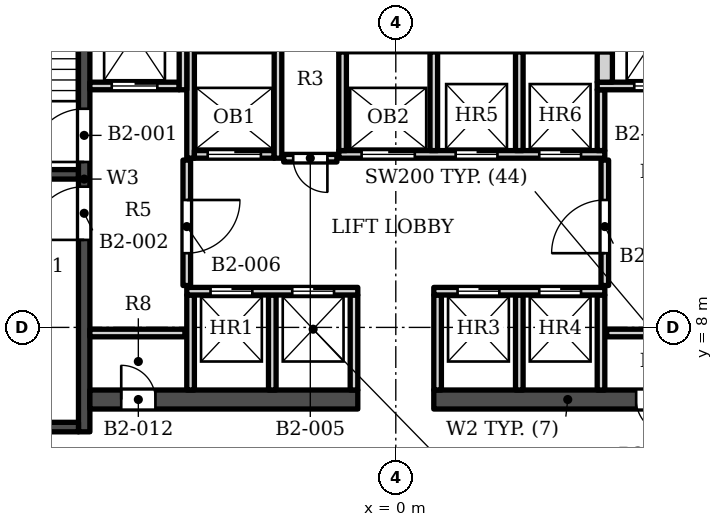
"""IFC4 building model, lengths in metres.
Left out: names, types, materials, properties, quantities, classifications, styles, units other than length and angle.
Written with IfcOpenShell. Run it as: python <this file> out.ifc"""

import sys

from ifc_helpers import new_model, si_unit, direction, frame, frame_2d, origin, place, context, subcontext, project, spatial, rectangle, extrude, element, fill, save


model = new_model("IFC4")
c1 = context("Model", 3, precision=1e-05, world=origin(), true_north=direction((0.0, 1.0)))
c2 = subcontext(c1, "Body", "Model", "MODEL_VIEW")
j1 = project(units=[si_unit("LENGTHUNIT", "METRE"), si_unit("PLANEANGLEUNIT", "RADIAN")], contexts=[c1])
p1 = place(None, origin())
s1 = spatial("IfcSite", under=j1, at=p1, CompositionType="ELEMENT")
p2 = place(p1, origin())
s2 = spatial("IfcBuilding", under=s1, at=p2, CompositionType="ELEMENT")
p3 = place(p2, frame((0.0, 0.0, -10.0)))
s3 = spatial("IfcBuildingStorey", under=s2, at=p3, CompositionType="ELEMENT", Elevation=-10.0)
p4 = place(p3, frame((-8.2, 5.253, -1.6), z_axis=(0.0, 0.0, 1.0), x_axis=(0.0, 1.0, 0.0)))
e1 = element("IfcWall", 1, at=p4, inside=s3, PredefinedType="SHEAR", context=c2, shape_type="SweptSolid", body=[
    extrude(rectangle(XDim=13.3, YDim=0.3, at=frame_2d((6.65, 0.0))), origin(), (0.0, 0.0, 1.0), 6.6),
])
p5 = place(p4, frame((7.1, 0.0, 1.6)))
e2 = element("IfcOpeningElement", 2, at=p5, cuts=e1, PredefinedType="OPENING", context=c2, shape_type="SweptSolid", body=[
    extrude(rectangle(XDim=1.4, YDim=2.1, at=frame_2d((0.7, 1.05))), frame((0.0, 0.16, 0.0), z_axis=(0.0, -1.0, 0.0), x_axis=(1.0, 0.0, 0.0)), (0.0, 0.0, 1.0), 0.32),
])
p6 = place(p4, frame((5.05, 0.0, 1.6)))
e3 = element("IfcOpeningElement", 3, at=p6, cuts=e1, PredefinedType="OPENING", context=c2, shape_type="SweptSolid", body=[
    extrude(rectangle(XDim=1.4, YDim=2.1, at=frame_2d((0.7, 1.05))), frame((0.0, 0.16, 0.0), z_axis=(0.0, -1.0, 0.0), x_axis=(1.0, 0.0, 0.0)), (0.0, 0.0, 1.0), 0.32),
])
for number, where, z_axis, x_axis in (
    (4, (-12.1, 12.028, -1.6), (0.0, 0.0, 1.0), (1.0, 0.0, 0.0)),
    (5, (-12.1, 5.378, -1.6), (0.0, 0.0, 1.0), (1.0, 0.0, 0.0)),
):
    element("IfcWall", number, at=place(p3, frame(where, z_axis=z_axis, x_axis=x_axis)), inside=s3, PredefinedType="SHEAR", context=c2, shape_type="SweptSolid", body=[
        extrude(rectangle(XDim=3.75, YDim=0.25, at=frame_2d((1.875, 0.0))), origin(), (0.0, 0.0, 1.0), 6.6),
    ])
p7 = place(p3, frame((-8.05, 6.103, -1.6), z_axis=(0.0, 0.0, 1.0), x_axis=(1.0, 0.0, 0.0)))
e6 = element("IfcWall", 6, at=p7, inside=s3, PredefinedType="SHEAR", context=c2, shape_type="SweptSolid", body=[
    extrude(rectangle(XDim=7.05, YDim=0.5, at=frame_2d((3.525, 0.0))), origin(), (0.0, 0.0, 1.0), 6.6),
])
p8 = place(p7, frame((0.825, 0.0, 1.6)))
e7 = element("IfcOpeningElement", 7, at=p8, cuts=e6, PredefinedType="OPENING", context=c2, shape_type="SweptSolid", body=[
    extrude(rectangle(XDim=0.9, YDim=2.1, at=frame_2d((0.45, 1.05))), frame((0.0, 0.26, 0.0), z_axis=(0.0, -1.0, 0.0), x_axis=(1.0, 0.0, 0.0)), (0.0, 0.0, 1.0), 0.52),
])
p9 = place(p3, frame((1.0, 6.103, -1.6), z_axis=(0.0, 0.0, 1.0), x_axis=(1.0, 0.0, 0.0)))
e8 = element("IfcWall", 8, at=p9, inside=s3, PredefinedType="SHEAR", context=c2, shape_type="SweptSolid", body=[
    extrude(rectangle(XDim=7.05, YDim=0.5, at=frame_2d((3.525, 0.0))), origin(), (0.0, 0.0, 1.0), 6.6),
])
p10 = place(p9, frame((5.325, 0.0, 1.6)))
e9 = element("IfcOpeningElement", 9, at=p10, cuts=e8, PredefinedType="OPENING", context=c2, shape_type="SweptSolid", body=[
    extrude(rectangle(XDim=0.9, YDim=2.1, at=frame_2d((0.45, 1.05))), frame((0.0, 0.26, 0.0), z_axis=(0.0, -1.0, 0.0), x_axis=(1.0, 0.0, 0.0)), (0.0, 0.0, 1.0), 0.52),
])
for number, where, z_axis, x_axis in (
    (10, (-5.4, 6.353, 0.0), (0.0, 0.0, 1.0), (0.0, 1.0, 0.0)),
    (11, (-3.25, 6.353, 0.0), (0.0, 0.0, 1.0), (0.0, 1.0, 0.0)),
    (12, (-1.1, 6.353, 0.0), (0.0, 0.0, 1.0), (0.0, 1.0, 0.0)),
    (13, (1.1, 6.353, 0.0), (0.0, 0.0, 1.0), (0.0, 1.0, 0.0)),
    (14, (3.25, 6.353, 0.0), (0.0, 0.0, 1.0), (0.0, 1.0, 0.0)),
    (15, (5.4, 6.353, 0.0), (0.0, 0.0, 1.0), (0.0, 1.0, 0.0)),
    (16, (-8.05, 7.853, 0.0), (0.0, 0.0, 1.0), (1.0, 0.0, 0.0)),
    (17, (5.55, 7.853, 0.0), (0.0, 0.0, 1.0), (1.0, 0.0, 0.0)),
):
    element("IfcWall", number, at=place(p3, frame(where, z_axis=z_axis, x_axis=x_axis)), inside=s3, PredefinedType="SOLIDWALL", context=c2, shape_type="SweptSolid", body=[
        extrude(rectangle(XDim=2.5, YDim=0.2, at=frame_2d((1.25, 0.0))), origin(), (0.0, 0.0, 1.0), 4.5),
    ])
p11 = place(p3, frame((-5.5, 8.953, 0.0), z_axis=(0.0, 0.0, 1.0), x_axis=(1.0, 0.0, 0.0)))
e18 = element("IfcWall", 18, at=p11, inside=s3, PredefinedType="SOLIDWALL", context=c2, shape_type="SweptSolid", body=[
    extrude(rectangle(XDim=4.5, YDim=0.2, at=frame_2d((2.25, 0.0))), origin(), (0.0, 0.0, 1.0), 4.5),
])
p12 = place(p11, frame((0.625, 0.0, 0.0)))
e19 = element("IfcOpeningElement", 19, at=p12, cuts=e18, PredefinedType="OPENING", context=c2, shape_type="SweptSolid", body=[
    extrude(rectangle(XDim=1.1, YDim=2.1, at=frame_2d((0.55, 1.05))), frame((0.0, 0.11, 0.0), z_axis=(0.0, -1.0, 0.0), x_axis=(1.0, 0.0, 0.0)), (0.0, 0.0, 1.0), 0.22),
])
p13 = place(p11, frame((2.775, 0.0, 0.0)))
e20 = element("IfcOpeningElement", 20, at=p13, cuts=e18, PredefinedType="OPENING", context=c2, shape_type="SweptSolid", body=[
    extrude(rectangle(XDim=1.1, YDim=2.1, at=frame_2d((0.55, 1.05))), frame((0.0, 0.11, 0.0), z_axis=(0.0, -1.0, 0.0), x_axis=(1.0, 0.0, 0.0)), (0.0, 0.0, 1.0), 0.22),
])
p14 = place(p3, frame((1.0, 8.953, 0.0), z_axis=(0.0, 0.0, 1.0), x_axis=(1.0, 0.0, 0.0)))
e21 = element("IfcWall", 21, at=p14, inside=s3, PredefinedType="SOLIDWALL", context=c2, shape_type="SweptSolid", body=[
    extrude(rectangle(XDim=4.5, YDim=0.2, at=frame_2d((2.25, 0.0))), origin(), (0.0, 0.0, 1.0), 4.5),
])
p15 = place(p14, frame((0.625, 0.0, 0.0)))
e22 = element("IfcOpeningElement", 22, at=p15, cuts=e21, PredefinedType="OPENING", context=c2, shape_type="SweptSolid", body=[
    extrude(rectangle(XDim=1.1, YDim=2.1, at=frame_2d((0.55, 1.05))), frame((0.0, 0.11, 0.0), z_axis=(0.0, -1.0, 0.0), x_axis=(1.0, 0.0, 0.0)), (0.0, 0.0, 1.0), 0.22),
])
p16 = place(p14, frame((2.775, 0.0, 0.0)))
e23 = element("IfcOpeningElement", 23, at=p16, cuts=e21, PredefinedType="OPENING", context=c2, shape_type="SweptSolid", body=[
    extrude(rectangle(XDim=1.1, YDim=2.1, at=frame_2d((0.55, 1.05))), frame((0.0, 0.11, 0.0), z_axis=(0.0, -1.0, 0.0), x_axis=(1.0, 0.0, 0.0)), (0.0, 0.0, 1.0), 0.22),
])
p17 = place(p3, frame((-5.5, 9.103, 0.0), z_axis=(0.0, 0.0, 1.0), x_axis=(0.0, 1.0, 0.0)))
e24 = element("IfcWall", 24, at=p17, inside=s3, PredefinedType="SOLIDWALL", context=c2, shape_type="SweptSolid", body=[
    extrude(rectangle(XDim=3.3, YDim=0.2, at=frame_2d((1.65, 0.0))), origin(), (0.0, 0.0, 1.0), 4.5),
])
p18 = place(p17, frame((0.85, 0.0, 0.0)))
e25 = element("IfcOpeningElement", 25, at=p18, cuts=e24, PredefinedType="OPENING", context=c2, shape_type="SweptSolid", body=[
    extrude(rectangle(XDim=1.4, YDim=2.1, at=frame_2d((0.7, 1.05))), frame((0.0, 0.11, 0.0), z_axis=(0.0, -1.0, 0.0), x_axis=(1.0, 0.0, 0.0)), (0.0, 0.0, 1.0), 0.22),
])
p19 = place(p3, frame((5.5, 9.103, 0.0), z_axis=(0.0, 0.0, 1.0), x_axis=(0.0, 1.0, 0.0)))
e26 = element("IfcWall", 26, at=p19, inside=s3, PredefinedType="SOLIDWALL", context=c2, shape_type="SweptSolid", body=[
    extrude(rectangle(XDim=3.3, YDim=0.2, at=frame_2d((1.65, 0.0))), origin(), (0.0, 0.0, 1.0), 4.5),
])
p20 = place(p19, frame((0.85, 0.0, 0.0)))
e27 = element("IfcOpeningElement", 27, at=p20, cuts=e26, PredefinedType="OPENING", context=c2, shape_type="SweptSolid", body=[
    extrude(rectangle(XDim=1.4, YDim=2.1, at=frame_2d((0.7, 1.05))), frame((0.0, 0.11, 0.0), z_axis=(0.0, -1.0, 0.0), x_axis=(1.0, 0.0, 0.0)), (0.0, 0.0, 1.0), 0.22),
])
p21 = place(p3, frame((-2.95, 12.453, 0.0), z_axis=(0.0, 0.0, 1.0), x_axis=(1.0, 0.0, 0.0)))
e28 = element("IfcWall", 28, at=p21, inside=s3, PredefinedType="SOLIDWALL", context=c2, shape_type="SweptSolid", body=[
    extrude(rectangle(XDim=1.4, YDim=0.2, at=frame_2d((0.7, 0.0))), origin(), (0.0, 0.0, 1.0), 4.5),
])
p22 = place(p21, frame((0.25, 0.0, 0.0)))
e29 = element("IfcOpeningElement", 29, at=p22, cuts=e28, PredefinedType="OPENING", context=c2, shape_type="SweptSolid", body=[
    extrude(rectangle(XDim=0.9, YDim=2.1, at=frame_2d((0.45, 1.05))), frame((0.0, 0.11, 0.0), z_axis=(0.0, -1.0, 0.0), x_axis=(1.0, 0.0, 0.0)), (0.0, 0.0, 1.0), 0.22),
])
p23 = place(p3, frame((-5.4, 12.453, 0.0), z_axis=(0.0, 0.0, 1.0), x_axis=(0.0, 1.0, 0.0)))
e30 = element("IfcWall", 30, at=p23, inside=s3, PredefinedType="SOLIDWALL", context=c2, shape_type="SweptSolid", body=[
    extrude(rectangle(XDim=3.0, YDim=0.2, at=frame_2d((1.5, 0.0))), origin(), (0.0, 0.0, 1.0), 4.5),
])
p24 = place(p3, frame((-5.3, 12.552, 0.0), z_axis=(0.0, 0.0, 1.0), x_axis=(1.0, 0.0, 0.0)))
e31 = element("IfcWall", 31, at=p24, inside=s3, PredefinedType="SOLIDWALL", context=c2, shape_type="SweptSolid", body=[
    extrude(rectangle(XDim=2.1, YDim=0.2, at=frame_2d((1.05, 0.0))), origin(), (0.0, 0.0, 1.0), 4.5),
])
p25 = place(p24, frame((0.35, 0.0, 0.0)))
e32 = element("IfcOpeningElement", 32, at=p25, cuts=e31, PredefinedType="OPENING", context=c2, shape_type="SweptSolid", body=[
    extrude(rectangle(XDim=1.4, YDim=2.4, at=frame_2d((0.7, 1.2))), frame((0.0, 0.11, 0.0), z_axis=(0.0, -1.0, 0.0), x_axis=(1.0, 0.0, 0.0)), (0.0, 0.0, 1.0), 0.22),
])
p26 = place(p3, frame((-3.1, 12.453, 0.0), z_axis=(0.0, 0.0, 1.0), x_axis=(0.0, 1.0, 0.0)))
e33 = element("IfcWall", 33, at=p26, inside=s3, PredefinedType="SOLIDWALL", context=c2, shape_type="SweptSolid", body=[
    extrude(rectangle(XDim=3.0, YDim=0.2, at=frame_2d((1.5, 0.0))), origin(), (0.0, 0.0, 1.0), 4.5),
])
p27 = place(p3, frame((-1.5, 12.552, 0.0), z_axis=(0.0, 0.0, 1.0), x_axis=(1.0, 0.0, 0.0)))
e34 = element("IfcWall", 34, at=p27, inside=s3, PredefinedType="SOLIDWALL", context=c2, shape_type="SweptSolid", body=[
    extrude(rectangle(XDim=7.0, YDim=0.2, at=frame_2d((3.5, 0.0))), origin(), (0.0, 0.0, 1.0), 4.5),
])
p28 = place(p27, frame((0.6, 0.0, 0.0)))
e35 = element("IfcOpeningElement", 35, at=p28, cuts=e34, PredefinedType="OPENING", context=c2, shape_type="SweptSolid", body=[
    extrude(rectangle(XDim=1.4, YDim=2.4, at=frame_2d((0.7, 1.2))), frame((0.0, 0.11, 0.0), z_axis=(0.0, -1.0, 0.0), x_axis=(1.0, 0.0, 0.0)), (0.0, 0.0, 1.0), 0.22),
])
p29 = place(p27, frame((3.075, 0.0, 0.0)))
e36 = element("IfcOpeningElement", 36, at=p29, cuts=e34, PredefinedType="OPENING", context=c2, shape_type="SweptSolid", body=[
    extrude(rectangle(XDim=1.1, YDim=2.1, at=frame_2d((0.55, 1.05))), frame((0.0, 0.11, 0.0), z_axis=(0.0, -1.0, 0.0), x_axis=(1.0, 0.0, 0.0)), (0.0, 0.0, 1.0), 0.22),
])
p30 = place(p27, frame((5.275, 0.0, 0.0)))
e37 = element("IfcOpeningElement", 37, at=p30, cuts=e34, PredefinedType="OPENING", context=c2, shape_type="SweptSolid", body=[
    extrude(rectangle(XDim=1.1, YDim=2.1, at=frame_2d((0.55, 1.05))), frame((0.0, 0.11, 0.0), z_axis=(0.0, -1.0, 0.0), x_axis=(1.0, 0.0, 0.0)), (0.0, 0.0, 1.0), 0.22),
])
for number, where, z_axis, x_axis in (
    (38, (-1.4, 12.653, 0.0), (0.0, 0.0, 1.0), (0.0, 1.0, 0.0)),
    (39, (1.0, 12.653, 0.0), (0.0, 0.0, 1.0), (0.0, 1.0, 0.0)),
    (40, (3.25, 12.653, 0.0), (0.0, 0.0, 1.0), (0.0, 1.0, 0.0)),
):
    element("IfcWall", number, at=place(p3, frame(where, z_axis=z_axis, x_axis=x_axis)), inside=s3, PredefinedType="SOLIDWALL", context=c2, shape_type="SweptSolid", body=[
        extrude(rectangle(XDim=2.6, YDim=0.2, at=frame_2d((1.3, 0.0))), origin(), (0.0, 0.0, 1.0), 4.5),
    ])
p31 = place(p3, frame((5.4, 12.653, 0.0), z_axis=(0.0, 0.0, 1.0), x_axis=(0.0, 1.0, 0.0)))
e41 = element("IfcWall", 41, at=p31, inside=s3, PredefinedType="SOLIDWALL", context=c2, shape_type="SweptSolid", body=[
    extrude(rectangle(XDim=1.6, YDim=0.2, at=frame_2d((0.8, 0.0))), origin(), (0.0, 0.0, 1.0), 4.5),
])
p32 = place(p3, frame((-8.05, 14.353, 0.0), z_axis=(0.0, 0.0, 1.0), x_axis=(1.0, 0.0, 0.0)))
e42 = element("IfcWall", 42, at=p32, inside=s3, PredefinedType="SOLIDWALL", context=c2, shape_type="SweptSolid", body=[
    extrude(rectangle(XDim=2.35, YDim=0.2, at=frame_2d((1.175, 0.0))), origin(), (0.0, 0.0, 1.0), 4.5),
])
p33 = place(p32, frame((0.575, 0.0, 0.0)))
e43 = element("IfcOpeningElement", 43, at=p33, cuts=e42, PredefinedType="OPENING", context=c2, shape_type="SweptSolid", body=[
    extrude(rectangle(XDim=1.2, YDim=2.1, at=frame_2d((0.6, 1.05))), frame((0.0, 0.11, 0.0), z_axis=(0.0, -1.0, 0.0), x_axis=(1.0, 0.0, 0.0)), (0.0, 0.0, 1.0), 0.22),
])
p34 = place(p3, frame((-5.6, 14.253, 0.0), z_axis=(0.0, 0.0, 1.0), x_axis=(0.0, 1.0, 0.0)))
e44 = element("IfcWall", 44, at=p34, inside=s3, PredefinedType="SOLIDWALL", context=c2, shape_type="SweptSolid", body=[
    extrude(rectangle(XDim=4.3, YDim=0.2, at=frame_2d((2.15, 0.0))), origin(), (0.0, 0.0, 1.0), 4.5),
])
p35 = place(p3, frame((5.3, 14.353, 0.0), z_axis=(0.0, 0.0, 1.0), x_axis=(1.0, 0.0, 0.0)))
e45 = element("IfcWall", 45, at=p35, inside=s3, PredefinedType="SOLIDWALL", context=c2, shape_type="SweptSolid", body=[
    extrude(rectangle(XDim=2.75, YDim=0.2, at=frame_2d((1.375, 0.0))), origin(), (0.0, 0.0, 1.0), 4.5),
])
p36 = place(p35, frame((0.975, 0.0, 0.0)))
e46 = element("IfcOpeningElement", 46, at=p36, cuts=e45, PredefinedType="OPENING", context=c2, shape_type="SweptSolid", body=[
    extrude(rectangle(XDim=1.2, YDim=2.1, at=frame_2d((0.6, 1.05))), frame((0.0, 0.11, 0.0), z_axis=(0.0, -1.0, 0.0), x_axis=(1.0, 0.0, 0.0)), (0.0, 0.0, 1.0), 0.22),
])
p37 = place(p3, frame((5.5, 14.453, 0.0), z_axis=(0.0, 0.0, 1.0), x_axis=(0.0, 1.0, 0.0)))
e47 = element("IfcWall", 47, at=p37, inside=s3, PredefinedType="SOLIDWALL", context=c2, shape_type="SweptSolid", body=[
    extrude(rectangle(XDim=0.8, YDim=0.4, at=frame_2d((0.4, 0.0))), origin(), (0.0, 0.0, 1.0), 4.5),
])
p38 = place(p3, frame((-5.3, 15.353, 0.0), z_axis=(0.0, 0.0, 1.0), x_axis=(1.0, 0.0, 0.0)))
e48 = element("IfcWall", 48, at=p38, inside=s3, PredefinedType="SOLIDWALL", context=c2, shape_type="SweptSolid", body=[
    extrude(rectangle(XDim=2.1, YDim=0.2, at=frame_2d((1.05, 0.0))), origin(), (0.0, 0.0, 1.0), 4.5),
])
p39 = place(p3, frame((-1.5, 15.353, 0.0), z_axis=(0.0, 0.0, 1.0), x_axis=(1.0, 0.0, 0.0)))
e49 = element("IfcWall", 49, at=p39, inside=s3, PredefinedType="SOLIDWALL", context=c2, shape_type="SweptSolid", body=[
    extrude(rectangle(XDim=7.2, YDim=0.2, at=frame_2d((3.6, 0.0))), origin(), (0.0, 0.0, 1.0), 4.5),
])
p40 = place(p12, origin())
e50 = element("IfcDoor", 50, at=p40, inside=s3, OperationType="DOUBLE_DOOR_SLIDING", PredefinedType="DOOR", context=c2, shape_type="SweptSolid", body=[
    extrude(rectangle(XDim=1.1, YDim=2.1, at=frame_2d((0.55, 1.05))), frame((0.0, 0.025, 0.0), z_axis=(0.0, -1.0, 0.0), x_axis=(1.0, 0.0, 0.0)), (0.0, 0.0, 1.0), 0.05),
])
fill(e19, e50)
p41 = place(p13, origin())
e51 = element("IfcDoor", 51, at=p41, inside=s3, OperationType="DOUBLE_DOOR_SLIDING", PredefinedType="DOOR", context=c2, shape_type="SweptSolid", body=[
    extrude(rectangle(XDim=1.1, YDim=2.1, at=frame_2d((0.55, 1.05))), frame((0.0, 0.025, 0.0), z_axis=(0.0, -1.0, 0.0), x_axis=(1.0, 0.0, 0.0)), (0.0, 0.0, 1.0), 0.05),
])
fill(e20, e51)
p42 = place(p15, origin())
e52 = element("IfcDoor", 52, at=p42, inside=s3, OperationType="DOUBLE_DOOR_SLIDING", PredefinedType="DOOR", context=c2, shape_type="SweptSolid", body=[
    extrude(rectangle(XDim=1.1, YDim=2.1, at=frame_2d((0.55, 1.05))), frame((0.0, 0.025, 0.0), z_axis=(0.0, -1.0, 0.0), x_axis=(1.0, 0.0, 0.0)), (0.0, 0.0, 1.0), 0.05),
])
fill(e22, e52)
p43 = place(p16, origin())
e53 = element("IfcDoor", 53, at=p43, inside=s3, OperationType="DOUBLE_DOOR_SLIDING", PredefinedType="DOOR", context=c2, shape_type="SweptSolid", body=[
    extrude(rectangle(XDim=1.1, YDim=2.1, at=frame_2d((0.55, 1.05))), frame((0.0, 0.025, 0.0), z_axis=(0.0, -1.0, 0.0), x_axis=(1.0, 0.0, 0.0)), (0.0, 0.0, 1.0), 0.05),
])
fill(e23, e53)
p44 = place(p25, origin())
e54 = element("IfcDoor", 54, at=p44, inside=s3, OperationType="DOUBLE_DOOR_SLIDING", PredefinedType="DOOR", context=c2, shape_type="SweptSolid", body=[
    extrude(rectangle(XDim=1.4, YDim=2.4, at=frame_2d((0.7, 1.2))), frame((0.0, 0.025, 0.0), z_axis=(0.0, -1.0, 0.0), x_axis=(1.0, 0.0, 0.0)), (0.0, 0.0, 1.0), 0.05),
])
fill(e32, e54)
p45 = place(p28, origin())
e55 = element("IfcDoor", 55, at=p45, inside=s3, OperationType="DOUBLE_DOOR_SLIDING", PredefinedType="DOOR", context=c2, shape_type="SweptSolid", body=[
    extrude(rectangle(XDim=1.4, YDim=2.4, at=frame_2d((0.7, 1.2))), frame((0.0, 0.025, 0.0), z_axis=(0.0, -1.0, 0.0), x_axis=(1.0, 0.0, 0.0)), (0.0, 0.0, 1.0), 0.05),
])
fill(e35, e55)
p46 = place(p29, origin())
e56 = element("IfcDoor", 56, at=p46, inside=s3, OperationType="DOUBLE_DOOR_SLIDING", PredefinedType="DOOR", context=c2, shape_type="SweptSolid", body=[
    extrude(rectangle(XDim=1.1, YDim=2.1, at=frame_2d((0.55, 1.05))), frame((0.0, 0.025, 0.0), z_axis=(0.0, -1.0, 0.0), x_axis=(1.0, 0.0, 0.0)), (0.0, 0.0, 1.0), 0.05),
])
fill(e36, e56)
p47 = place(p30, origin())
e57 = element("IfcDoor", 57, at=p47, inside=s3, OperationType="DOUBLE_DOOR_SLIDING", PredefinedType="DOOR", context=c2, shape_type="SweptSolid", body=[
    extrude(rectangle(XDim=1.1, YDim=2.1, at=frame_2d((0.55, 1.05))), frame((0.0, 0.025, 0.0), z_axis=(0.0, -1.0, 0.0), x_axis=(1.0, 0.0, 0.0)), (0.0, 0.0, 1.0), 0.05),
])
fill(e37, e57)
p48 = place(p33, origin())
e58 = element("IfcDoor", 58, at=p48, inside=s3, OperationType="DOUBLE_DOOR_SLIDING", PredefinedType="DOOR", context=c2, shape_type="SweptSolid", body=[
    extrude(rectangle(XDim=1.2, YDim=2.1, at=frame_2d((0.6, 1.05))), frame((0.0, 0.025, 0.0), z_axis=(0.0, -1.0, 0.0), x_axis=(1.0, 0.0, 0.0)), (0.0, 0.0, 1.0), 0.05),
])
fill(e43, e58)
p49 = place(p36, origin())
e59 = element("IfcDoor", 59, at=p49, inside=s3, OperationType="DOUBLE_DOOR_SLIDING", PredefinedType="DOOR", context=c2, shape_type="SweptSolid", body=[
    extrude(rectangle(XDim=1.2, YDim=2.1, at=frame_2d((0.6, 1.05))), frame((0.0, 0.025, 0.0), z_axis=(0.0, -1.0, 0.0), x_axis=(1.0, 0.0, 0.0)), (0.0, 0.0, 1.0), 0.05),
])
fill(e46, e59)
p50 = place(p5, origin())
e60 = element("IfcDoor", 60, at=p50, inside=s3, OperationType="SINGLE_SWING_LEFT", PredefinedType="DOOR", context=c2, shape_type="SweptSolid", body=[
    extrude(rectangle(XDim=1.4, YDim=2.1, at=frame_2d((0.7, 1.05))), frame((0.0, 0.025, 0.0), z_axis=(0.0, -1.0, 0.0), x_axis=(1.0, 0.0, 0.0)), (0.0, 0.0, 1.0), 0.05),
])
fill(e2, e60)
p51 = place(p6, origin())
e61 = element("IfcDoor", 61, at=p51, inside=s3, OperationType="SINGLE_SWING_LEFT", PredefinedType="DOOR", context=c2, shape_type="SweptSolid", body=[
    extrude(rectangle(XDim=1.4, YDim=2.1, at=frame_2d((0.7, 1.05))), frame((0.0, 0.025, 0.0), z_axis=(0.0, -1.0, 0.0), x_axis=(1.0, 0.0, 0.0)), (0.0, 0.0, 1.0), 0.05),
])
fill(e3, e61)
p52 = place(p22, origin())
e62 = element("IfcDoor", 62, at=p52, inside=s3, OperationType="SINGLE_SWING_RIGHT", PredefinedType="DOOR", context=c2, shape_type="SweptSolid", body=[
    extrude(rectangle(XDim=0.9, YDim=2.1, at=frame_2d((0.45, 1.05))), frame((0.0, 0.025, 0.0), z_axis=(0.0, -1.0, 0.0), x_axis=(1.0, 0.0, 0.0)), (0.0, 0.0, 1.0), 0.05),
])
fill(e29, e62)
p53 = place(p18, origin())
e63 = element("IfcDoor", 63, at=p53, inside=s3, OperationType="SINGLE_SWING_RIGHT", PredefinedType="DOOR", context=c2, shape_type="SweptSolid", body=[
    extrude(rectangle(XDim=1.4, YDim=2.1, at=frame_2d((0.7, 1.05))), frame((0.0, 0.025, 0.0), z_axis=(0.0, -1.0, 0.0), x_axis=(1.0, 0.0, 0.0)), (0.0, 0.0, 1.0), 0.05),
])
fill(e25, e63)
p54 = place(p20, origin())
e64 = element("IfcDoor", 64, at=p54, inside=s3, OperationType="SINGLE_SWING_LEFT", PredefinedType="DOOR", context=c2, shape_type="SweptSolid", body=[
    extrude(rectangle(XDim=1.4, YDim=2.1, at=frame_2d((0.7, 1.05))), frame((0.0, 0.025, 0.0), z_axis=(0.0, -1.0, 0.0), x_axis=(1.0, 0.0, 0.0)), (0.0, 0.0, 1.0), 0.05),
])
fill(e27, e64)
p55 = place(p8, origin())
e65 = element("IfcDoor", 65, at=p55, inside=s3, OperationType="SINGLE_SWING_LEFT", PredefinedType="DOOR", context=c2, shape_type="SweptSolid", body=[
    extrude(rectangle(XDim=0.9, YDim=2.1, at=frame_2d((0.45, 1.05))), frame((0.0, 0.025, 0.0), z_axis=(0.0, -1.0, 0.0), x_axis=(1.0, 0.0, 0.0)), (0.0, 0.0, 1.0), 0.05),
])
fill(e7, e65)
p56 = place(p10, origin())
e66 = element("IfcDoor", 66, at=p56, inside=s3, OperationType="SINGLE_SWING_RIGHT", PredefinedType="DOOR", context=c2, shape_type="SweptSolid", body=[
    extrude(rectangle(XDim=0.9, YDim=2.1, at=frame_2d((0.45, 1.05))), frame((0.0, 0.025, 0.0), z_axis=(0.0, -1.0, 0.0), x_axis=(1.0, 0.0, 0.0)), (0.0, 0.0, 1.0), 0.05),
])
fill(e9, e66)
save(model, sys.argv[1])
